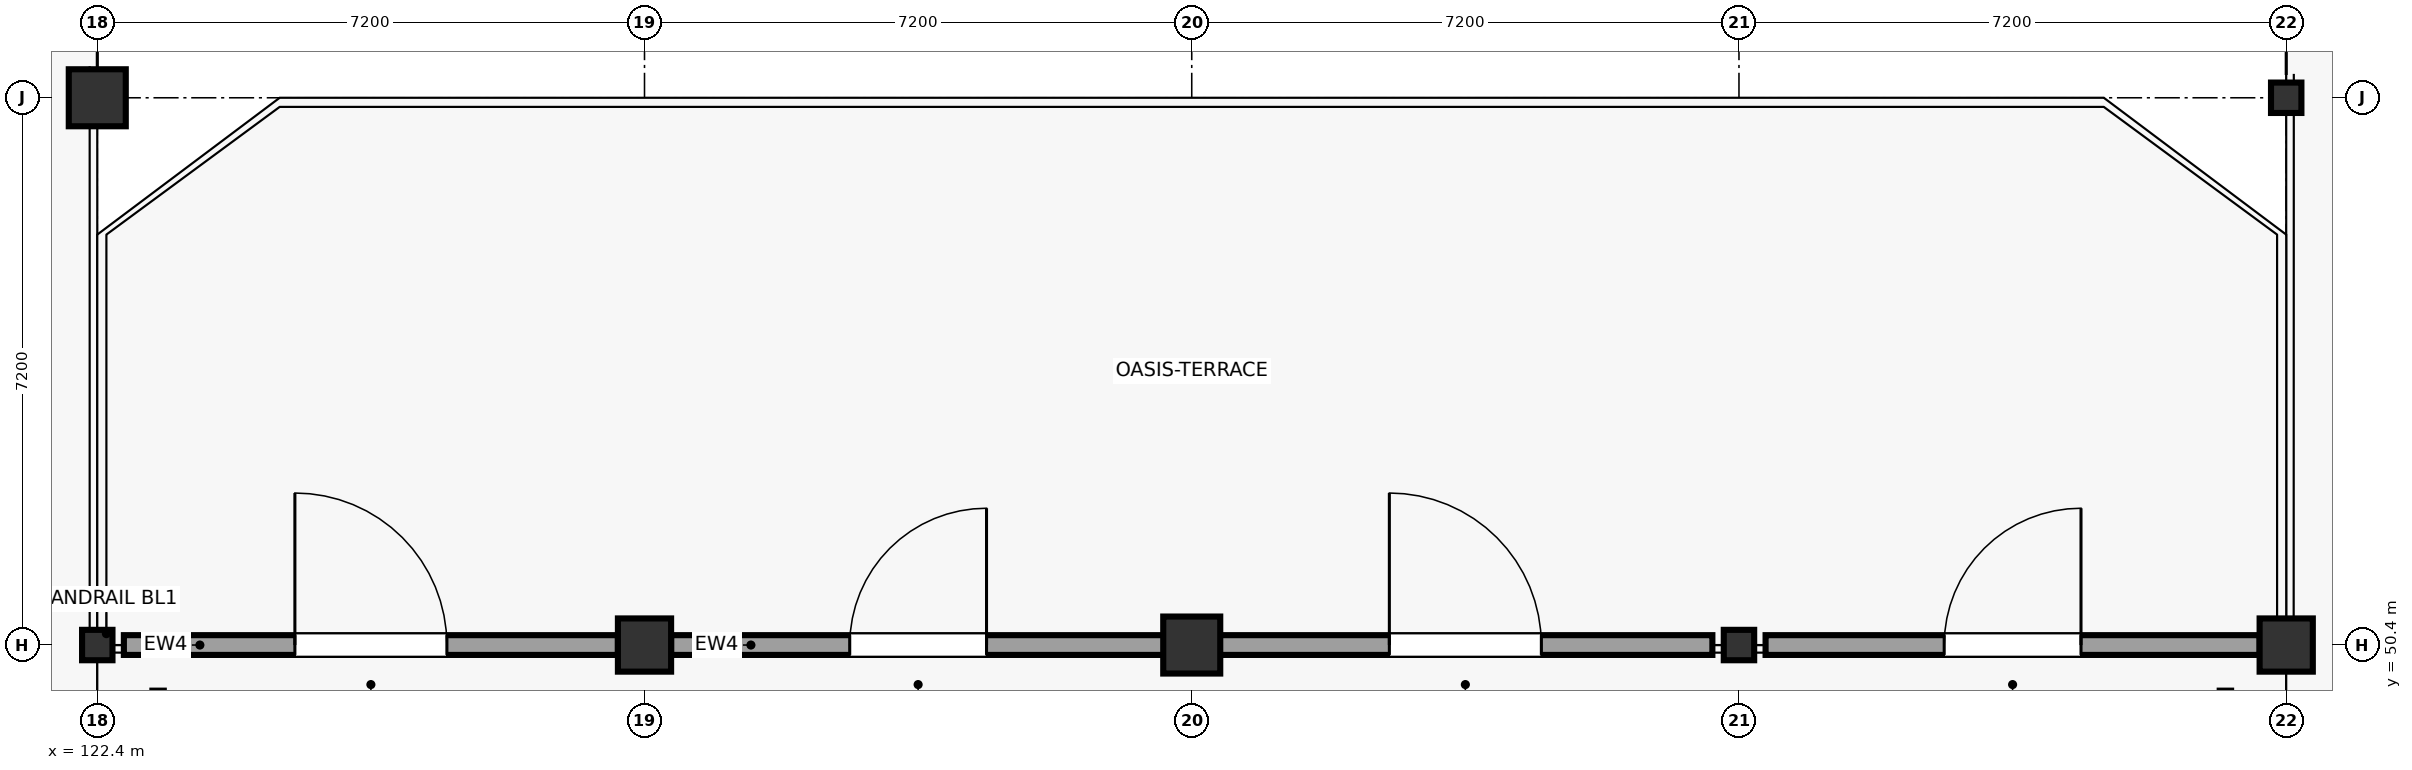
"""IFC4 building model, lengths in metres.
Left out: names, types, materials, properties, quantities, classifications, styles, units other than length and angle.
Written with IfcOpenShell. Run it as: python <this file> out.ifc"""

import sys

from ifc_helpers import new_model, si_unit, direction, frame, frame_2d, origin, origin_2d, place, context, subcontext, project, spatial, rectangle, hollow_rectangle, extrude, element, fill, save


model = new_model("IFC4")
c1 = context("Model", 3, precision=1e-05, world=origin(), true_north=direction((0.0, 1.0)))
c2 = subcontext(c1, "Body", "Model", "MODEL_VIEW")
j1 = project(units=[si_unit("LENGTHUNIT", "METRE"), si_unit("PLANEANGLEUNIT", "RADIAN")], contexts=[c1])
p1 = place(None, origin())
s1 = spatial("IfcSite", under=j1, at=p1, CompositionType="ELEMENT")
p2 = place(p1, origin())
s2 = spatial("IfcBuilding", under=s1, at=p2, CompositionType="ELEMENT")
p3 = place(p2, frame((0.0, 0.0, 9.6)))
s3 = spatial("IfcBuildingStorey", under=s2, at=p3, CompositionType="ELEMENT", Elevation=9.6)
p4 = place(p3, frame((122.4, 50.4, 0.0), z_axis=(0.0, 0.0, 1.0), x_axis=(1.0, 0.0, 0.0)))
e1 = element("IfcColumn", 1, at=p4, inside=s3, PredefinedType="COLUMN", context=c2, shape_type="SweptSolid", body=[
    extrude(hollow_rectangle(XDim=0.4, YDim=0.4, WallThickness=0.02, at=origin_2d()), origin(), (0.0, 0.0, 1.0), 4.2),
])
p5 = place(p3, frame((122.4, 57.6, 0.0), z_axis=(0.0, 0.0, 1.0), x_axis=(1.0, 0.0, 0.0)))
e2 = element("IfcColumn", 2, at=p5, inside=s3, PredefinedType="COLUMN", context=c2, shape_type="SweptSolid", body=[
    extrude(rectangle(XDim=0.75, YDim=0.75, at=origin_2d()), origin(), (0.0, 0.0, 1.0), 4.2),
])
p6 = place(p3, frame((129.6, 50.4, 0.0), z_axis=(0.0, 0.0, 1.0), x_axis=(1.0, 0.0, 0.0)))
e3 = element("IfcColumn", 3, at=p6, inside=s3, PredefinedType="COLUMN", context=c2, shape_type="SweptSolid", body=[
    extrude(rectangle(XDim=0.7, YDim=0.7, at=origin_2d()), origin(), (0.0, 0.0, 1.0), 4.2),
])
p7 = place(p3, frame((136.8, 50.4, 0.0), z_axis=(0.0, 0.0, 1.0), x_axis=(1.0, 0.0, 0.0)))
e4 = element("IfcColumn", 4, at=p7, inside=s3, PredefinedType="COLUMN", context=c2, shape_type="SweptSolid", body=[
    extrude(rectangle(XDim=0.75, YDim=0.75, at=origin_2d()), origin(), (0.0, 0.0, 1.0), 4.2),
])
p8 = place(p3, frame((144.0, 50.4, 0.0), z_axis=(0.0, 0.0, 1.0), x_axis=(1.0, 0.0, 0.0)))
e5 = element("IfcColumn", 5, at=p8, inside=s3, PredefinedType="COLUMN", context=c2, shape_type="SweptSolid", body=[
    extrude(hollow_rectangle(XDim=0.4, YDim=0.4, WallThickness=0.02, at=origin_2d()), origin(), (0.0, 0.0, 1.0), 4.2),
])
p9 = place(p3, frame((151.2, 50.4, 0.0), z_axis=(0.0, 0.0, 1.0), x_axis=(1.0, 0.0, 0.0)))
e6 = element("IfcColumn", 6, at=p9, inside=s3, PredefinedType="COLUMN", context=c2, shape_type="SweptSolid", body=[
    extrude(rectangle(XDim=0.7, YDim=0.7, at=origin_2d()), origin(), (0.0, 0.0, 1.0), 4.2),
])
p10 = place(p3, frame((151.2, 57.6, 0.0), z_axis=(0.0, 0.0, 1.0), x_axis=(1.0, 0.0, 0.0)))
e7 = element("IfcColumn", 7, at=p10, inside=s3, PredefinedType="COLUMN", context=c2, shape_type="SweptSolid", body=[
    extrude(hollow_rectangle(XDim=0.4, YDim=0.4, WallThickness=0.02, at=origin_2d()), origin(), (0.0, 0.0, 1.0), 4.2),
])
p11 = place(p3, frame((122.75, 50.4, 0.0), z_axis=(0.0, 0.0, 1.0), x_axis=(1.0, 0.0, 0.0)))
e8 = element("IfcWall", 8, at=p11, inside=s3, PredefinedType="SOLIDWALL", context=c2, shape_type="SweptSolid", body=[
    extrude(rectangle(XDim=6.5, YDim=0.26, at=frame_2d((3.25, 0.0))), origin(), (0.0, 0.0, 1.0), 2.94),
])
p12 = place(p11, frame((2.25, 0.0, 0.0)))
e9 = element("IfcOpeningElement", 9, at=p12, cuts=e8, PredefinedType="OPENING", context=c2, shape_type="SweptSolid", body=[
    extrude(rectangle(XDim=2.0, YDim=2.4, at=frame_2d((1.0, 1.2))), frame((0.0, 0.14, 0.0), z_axis=(0.0, -1.0, 0.0), x_axis=(1.0, 0.0, 0.0)), (0.0, 0.0, 1.0), 0.28),
])
p13 = place(p3, frame((129.95, 50.4, 0.0), z_axis=(0.0, 0.0, 1.0), x_axis=(1.0, 0.0, 0.0)))
e10 = element("IfcWall", 10, at=p13, inside=s3, PredefinedType="SOLIDWALL", context=c2, shape_type="SweptSolid", body=[
    extrude(rectangle(XDim=6.5, YDim=0.26, at=frame_2d((3.25, 0.0))), origin(), (0.0, 0.0, 1.0), 2.94),
])
p14 = place(p13, frame((2.35, 0.0, 0.0)))
e11 = element("IfcOpeningElement", 11, at=p14, cuts=e10, PredefinedType="OPENING", context=c2, shape_type="SweptSolid", body=[
    extrude(rectangle(XDim=1.8, YDim=2.35, at=frame_2d((0.9, 1.175))), frame((0.0, 0.14, 0.0), z_axis=(0.0, -1.0, 0.0), x_axis=(1.0, 0.0, 0.0)), (0.0, 0.0, 1.0), 0.28),
])
p15 = place(p3, frame((137.15, 50.4, 0.0), z_axis=(0.0, 0.0, 1.0), x_axis=(1.0, 0.0, 0.0)))
e12 = element("IfcWall", 12, at=p15, inside=s3, PredefinedType="SOLIDWALL", context=c2, shape_type="SweptSolid", body=[
    extrude(rectangle(XDim=6.5, YDim=0.26, at=frame_2d((3.25, 0.0))), origin(), (0.0, 0.0, 1.0), 2.94),
])
p16 = place(p15, frame((2.25, 0.0, 0.0)))
e13 = element("IfcOpeningElement", 13, at=p16, cuts=e12, PredefinedType="OPENING", context=c2, shape_type="SweptSolid", body=[
    extrude(rectangle(XDim=2.0, YDim=2.4, at=frame_2d((1.0, 1.2))), frame((0.0, 0.14, 0.0), z_axis=(0.0, -1.0, 0.0), x_axis=(1.0, 0.0, 0.0)), (0.0, 0.0, 1.0), 0.28),
])
p17 = place(p3, frame((144.35, 50.4, 0.0), z_axis=(0.0, 0.0, 1.0), x_axis=(1.0, 0.0, 0.0)))
e14 = element("IfcWall", 14, at=p17, inside=s3, PredefinedType="SOLIDWALL", context=c2, shape_type="SweptSolid", body=[
    extrude(rectangle(XDim=6.5, YDim=0.26, at=frame_2d((3.25, 0.0))), origin(), (0.0, 0.0, 1.0), 2.94),
])
p18 = place(p17, frame((2.35, 0.0, 0.0)))
e15 = element("IfcOpeningElement", 15, at=p18, cuts=e14, PredefinedType="OPENING", context=c2, shape_type="SweptSolid", body=[
    extrude(rectangle(XDim=1.8, YDim=2.35, at=frame_2d((0.9, 1.175))), frame((0.0, 0.14, 0.0), z_axis=(0.0, -1.0, 0.0), x_axis=(1.0, 0.0, 0.0)), (0.0, 0.0, 1.0), 0.28),
])
p19 = place(p3, frame((150.4, 43.6, 0.0), z_axis=(0.0, 0.0, 1.0), x_axis=(0.0, 1.0, 0.0)))
e16 = element("IfcWall", 16, at=p19, inside=s3, PredefinedType="PARTITIONING", context=c2, shape_type="SweptSolid", body=[
    extrude(rectangle(XDim=6.2, YDim=0.15, at=frame_2d((3.1, 0.0))), origin(), (0.0, 0.0, 1.0), 2.94),
])
p20 = place(p12, origin())
e17 = element("IfcDoor", 17, at=p20, inside=s3, OperationType="SINGLE_SWING_LEFT", PredefinedType="DOOR", context=c2, shape_type="SweptSolid", body=[
    extrude(rectangle(XDim=2.0, YDim=2.4, at=frame_2d((1.0, 1.2))), frame((0.0, 0.025, 0.0), z_axis=(0.0, -1.0, 0.0), x_axis=(1.0, 0.0, 0.0)), (0.0, 0.0, 1.0), 0.05),
])
fill(e9, e17)
p21 = place(p14, origin())
e18 = element("IfcDoor", 18, at=p21, inside=s3, OperationType="SINGLE_SWING_RIGHT", PredefinedType="DOOR", context=c2, shape_type="SweptSolid", body=[
    extrude(rectangle(XDim=1.8, YDim=2.35, at=frame_2d((0.9, 1.175))), frame((0.0, 0.025, 0.0), z_axis=(0.0, -1.0, 0.0), x_axis=(1.0, 0.0, 0.0)), (0.0, 0.0, 1.0), 0.05),
])
fill(e11, e18)
p22 = place(p16, origin())
e19 = element("IfcDoor", 19, at=p22, inside=s3, OperationType="SINGLE_SWING_LEFT", PredefinedType="DOOR", context=c2, shape_type="SweptSolid", body=[
    extrude(rectangle(XDim=2.0, YDim=2.4, at=frame_2d((1.0, 1.2))), frame((0.0, 0.025, 0.0), z_axis=(0.0, -1.0, 0.0), x_axis=(1.0, 0.0, 0.0)), (0.0, 0.0, 1.0), 0.05),
])
fill(e13, e19)
p23 = place(p18, origin())
e20 = element("IfcDoor", 20, at=p23, inside=s3, OperationType="SINGLE_SWING_RIGHT", PredefinedType="DOOR", context=c2, shape_type="SweptSolid", body=[
    extrude(rectangle(XDim=1.8, YDim=2.35, at=frame_2d((0.9, 1.175))), frame((0.0, 0.025, 0.0), z_axis=(0.0, -1.0, 0.0), x_axis=(1.0, 0.0, 0.0)), (0.0, 0.0, 1.0), 0.05),
])
fill(e15, e20)
save(model, sys.argv[1])
